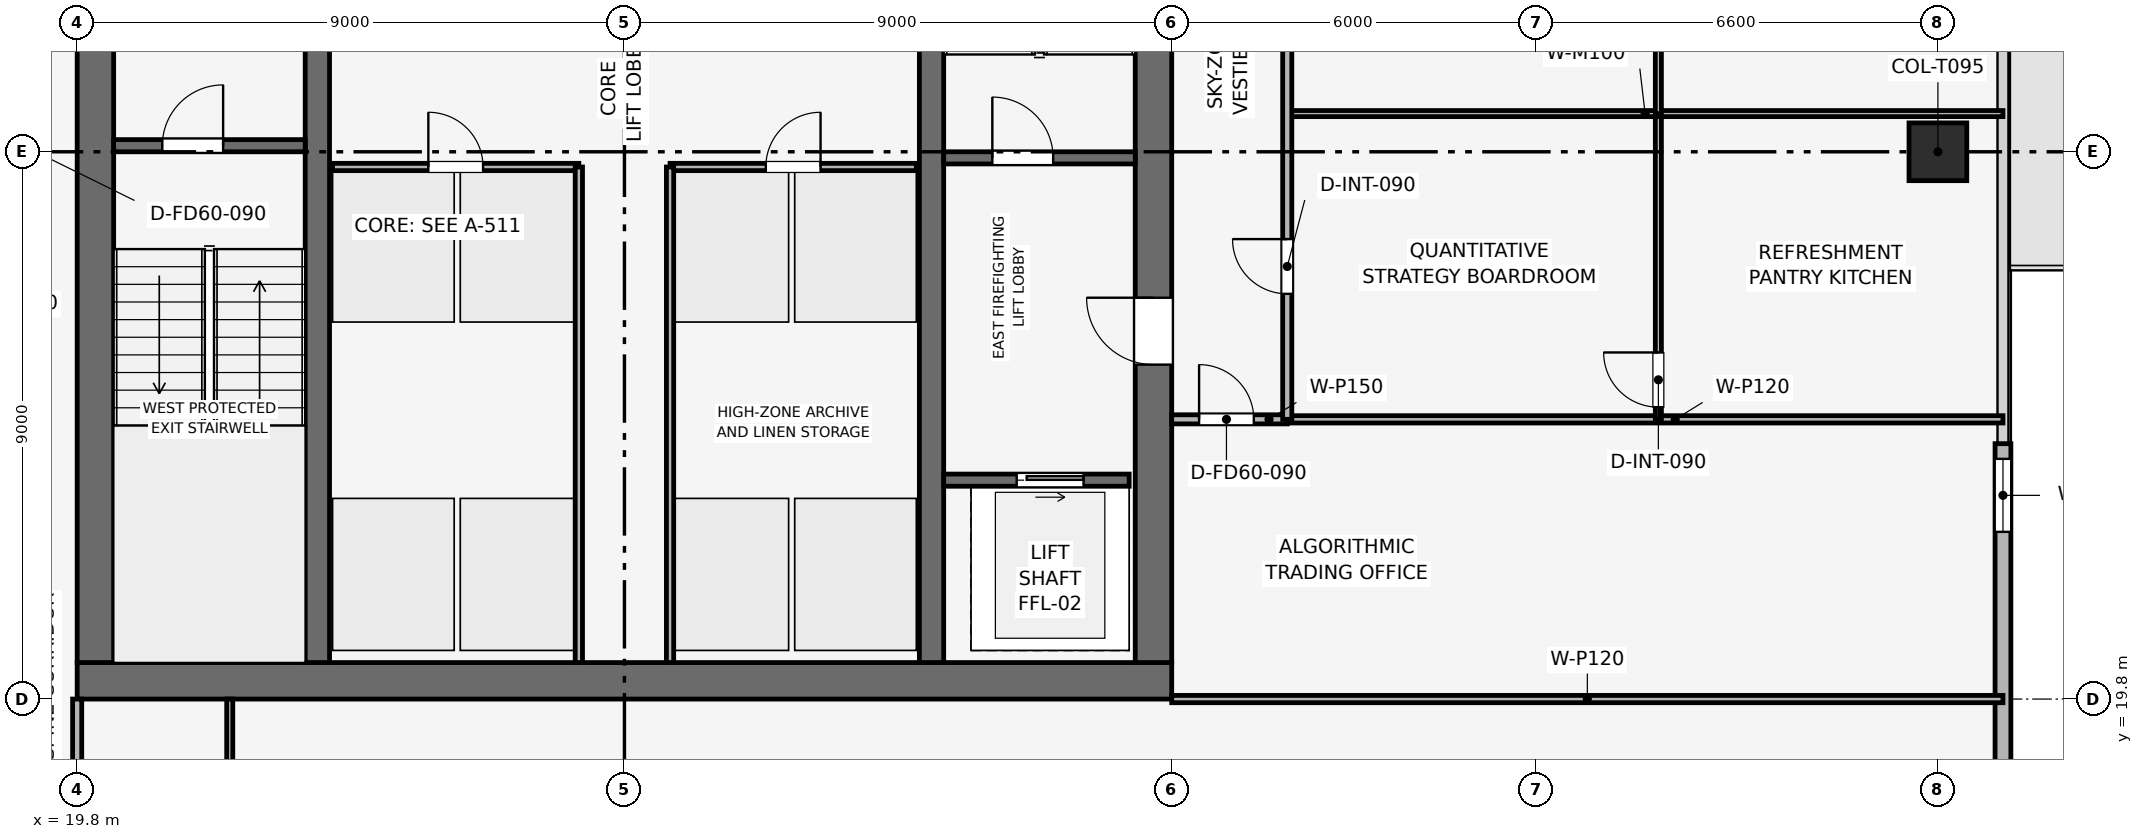
"""IFC4 building model, lengths in metres.
Left out: names, types, materials, properties, quantities, classifications, styles, units other than length and angle.
Written with IfcOpenShell. Run it as: python <this file> out.ifc"""

import sys

from ifc_helpers import new_model, si_unit, direction, frame, frame_2d, origin, origin_2d, place, context, subcontext, project, spatial, rectangle, extrude, element, fill, save


model = new_model("IFC4")
c1 = context("Model", 3, precision=1e-05, world=origin(), true_north=direction((0.0, 1.0)))
c2 = subcontext(c1, "Body", "Model", "MODEL_VIEW")
j1 = project(units=[si_unit("LENGTHUNIT", "METRE"), si_unit("PLANEANGLEUNIT", "RADIAN")], contexts=[c1])
p1 = place(None, origin())
s1 = spatial("IfcSite", under=j1, at=p1, CompositionType="ELEMENT")
p2 = place(p1, origin())
s2 = spatial("IfcBuilding", under=s1, at=p2, CompositionType="ELEMENT")
p3 = place(p2, frame((0.0, 0.0, 306.75)))
s3 = spatial("IfcBuildingStorey", under=s2, at=p3, CompositionType="ELEMENT", Elevation=306.75)
p4 = place(p3, frame((19.8, 20.1, 0.0), z_axis=(0.0, 0.0, 1.0), x_axis=(1.0, 0.0, 0.0)))
e1 = element("IfcWall", 1, at=p4, inside=s3, PredefinedType="SHEAR", context=c2, shape_type="SweptSolid", body=[
    extrude(rectangle(XDim=18.0, YDim=0.6, at=frame_2d((9.0, 0.0))), origin(), (0.0, 0.0, 1.0), 3.75),
])
p5 = place(p3, frame((20.1, 20.4, 0.0), z_axis=(0.0, 0.0, 1.0), x_axis=(0.0, 1.0, 0.0)))
e2 = element("IfcWall", 2, at=p5, inside=s3, PredefinedType="SHEAR", context=c2, shape_type="SweptSolid", body=[
    extrude(rectangle(XDim=16.8, YDim=0.6, at=frame_2d((8.4, 0.0))), origin(), (0.0, 0.0, 1.0), 3.75),
])
p6 = place(p5, frame((10.4, 0.0, 0.0)))
e3 = element("IfcOpeningElement", 3, at=p6, cuts=e2, PredefinedType="OPENING", context=c2, shape_type="SweptSolid", body=[
    extrude(rectangle(XDim=1.1, YDim=2.15, at=frame_2d((0.55, 1.075))), frame((0.0, 0.31, 0.0), z_axis=(0.0, -1.0, 0.0), x_axis=(1.0, 0.0, 0.0)), (0.0, 0.0, 1.0), 0.62),
])
p7 = place(p3, frame((37.5, 20.4, 0.0), z_axis=(0.0, 0.0, 1.0), x_axis=(0.0, 1.0, 0.0)))
e4 = element("IfcWall", 4, at=p7, inside=s3, PredefinedType="SHEAR", context=c2, shape_type="SweptSolid", body=[
    extrude(rectangle(XDim=16.8, YDim=0.6, at=frame_2d((8.4, 0.0))), origin(), (0.0, 0.0, 1.0), 3.75),
])
p8 = place(p7, frame((4.9, 0.0, 0.0)))
e5 = element("IfcOpeningElement", 5, at=p8, cuts=e4, PredefinedType="OPENING", context=c2, shape_type="SweptSolid", body=[
    extrude(rectangle(XDim=1.1, YDim=2.15, at=frame_2d((0.55, 1.075))), frame((0.0, 0.31, 0.0), z_axis=(0.0, -1.0, 0.0), x_axis=(1.0, 0.0, 0.0)), (0.0, 0.0, 1.0), 0.62),
])
for number, where, z_axis, x_axis in (
    (6, (23.75, 20.4, 0.0), (0.0, 0.0, 1.0), (0.0, 1.0, 0.0)),
    (7, (33.85, 20.4, 0.0), (0.0, 0.0, 1.0), (0.0, 1.0, 0.0)),
):
    element("IfcWall", number, at=place(p3, frame(where, z_axis=z_axis, x_axis=x_axis)), inside=s3, PredefinedType="SHEAR", context=c2, shape_type="SweptSolid", body=[
        extrude(rectangle(XDim=16.8, YDim=0.4, at=frame_2d((8.4, 0.0))), origin(), (0.0, 0.0, 1.0), 3.75),
    ])
p9 = place(p3, frame((50.4, 28.8, 0.003), z_axis=(0.0, 0.0, 1.0), x_axis=(1.0, 0.0, 0.0)))
e8 = element("IfcColumn", 8, at=p9, inside=s3, PredefinedType="COLUMN", context=c2, shape_type="SweptSolid", body=[
    extrude(rectangle(XDim=0.95, YDim=0.95, at=origin_2d()), origin(), (0.0, 0.0, 1.0), 3.504),
])
p10 = place(p3, frame((51.47, 24.0, 0.0), z_axis=(0.0, 0.0, 1.0), x_axis=(0.0, -1.0, 0.0)))
e9 = element("IfcWall", 9, at=p10, inside=s3, PredefinedType="SOLIDWALL", context=c2, shape_type="SweptSolid", body=[
    extrude(rectangle(XDim=11.7, YDim=0.26, at=frame_2d((5.85, 0.0))), origin(), (0.0, 0.0, 1.0), 3.51),
])
p11 = place(p10, frame((0.25, 0.0, 0.9)))
e10 = element("IfcOpeningElement", 10, at=p11, cuts=e9, PredefinedType="OPENING", context=c2, shape_type="SweptSolid", body=[
    extrude(rectangle(XDim=1.2, YDim=2.1, at=frame_2d((0.6, 1.05))), frame((0.0, 0.14, 0.0), z_axis=(0.0, -1.0, 0.0), x_axis=(1.0, 0.0, 0.0)), (0.0, 0.0, 1.0), 0.28),
])
p12 = place(p3, frame((20.4, 28.9, 0.0), z_axis=(0.0, 0.0, 1.0), x_axis=(1.0, 0.0, 0.0)))
e11 = element("IfcWall", 11, at=p12, inside=s3, PredefinedType="SHEAR", context=c2, shape_type="SweptSolid", body=[
    extrude(rectangle(XDim=3.15, YDim=0.2, at=frame_2d((1.575, 0.0))), origin(), (0.0, 0.0, 1.0), 3.51),
])
p13 = place(p12, frame((0.8, 0.0, 0.0)))
e12 = element("IfcOpeningElement", 12, at=p13, cuts=e11, PredefinedType="OPENING", context=c2, shape_type="SweptSolid", body=[
    extrude(rectangle(XDim=1.0, YDim=2.1, at=frame_2d((0.5, 1.05))), frame((0.0, 0.11, 0.0), z_axis=(0.0, -1.0, 0.0), x_axis=(1.0, 0.0, 0.0)), (0.0, 0.0, 1.0), 0.22),
])
p14 = place(p3, frame((34.05, 28.7, 0.0), z_axis=(0.0, 0.0, 1.0), x_axis=(1.0, 0.0, 0.0)))
e13 = element("IfcWall", 13, at=p14, inside=s3, PredefinedType="SHEAR", context=c2, shape_type="SweptSolid", body=[
    extrude(rectangle(XDim=3.15, YDim=0.2, at=frame_2d((1.575, 0.0))), origin(), (0.0, 0.0, 1.0), 3.51),
])
p15 = place(p14, frame((0.8, 0.0, 0.0)))
e14 = element("IfcOpeningElement", 14, at=p15, cuts=e13, PredefinedType="OPENING", context=c2, shape_type="SweptSolid", body=[
    extrude(rectangle(XDim=1.0, YDim=2.1, at=frame_2d((0.5, 1.05))), frame((0.0, 0.11, 0.0), z_axis=(0.0, -1.0, 0.0), x_axis=(1.0, 0.0, 0.0)), (0.0, 0.0, 1.0), 0.22),
])
p16 = place(p3, frame((34.05, 23.4, 0.0), z_axis=(0.0, 0.0, 1.0), x_axis=(1.0, 0.0, 0.0)))
e15 = element("IfcWall", 15, at=p16, inside=s3, PredefinedType="SHEAR", context=c2, shape_type="SweptSolid", body=[
    extrude(rectangle(XDim=3.05, YDim=0.2, at=frame_2d((1.525, 0.0))), origin(), (0.0, 0.0, 1.0), 3.51),
])
p17 = place(p16, frame((1.2, 0.0, 0.0)))
e16 = element("IfcOpeningElement", 16, at=p17, cuts=e15, PredefinedType="OPENING", context=c2, shape_type="SweptSolid", body=[
    extrude(rectangle(XDim=1.1, YDim=2.15, at=frame_2d((0.55, 1.075))), frame((0.0, 0.11, 0.0), z_axis=(0.0, -1.0, 0.0), x_axis=(1.0, 0.0, 0.0)), (0.0, 0.0, 1.0), 0.22),
])
p18 = place(p3, frame((24.0, 28.55, 0.0), z_axis=(0.0, 0.0, 1.0), x_axis=(1.0, 0.0, 0.0)))
e17 = element("IfcWall", 17, at=p18, inside=s3, PredefinedType="PARTITIONING", context=c2, shape_type="SweptSolid", body=[
    extrude(rectangle(XDim=4.05, YDim=0.12, at=frame_2d((2.025, 0.0))), origin(), (0.0, 0.0, 1.0), 3.51),
])
p19 = place(p18, frame((1.575, 0.0, 0.0)))
e18 = element("IfcOpeningElement", 18, at=p19, cuts=e17, PredefinedType="OPENING", context=c2, shape_type="SweptSolid", body=[
    extrude(rectangle(XDim=0.9, YDim=2.1, at=frame_2d((0.45, 1.05))), frame((0.0, 0.07, 0.0), z_axis=(0.0, -1.0, 0.0), x_axis=(1.0, 0.0, 0.0)), (0.0, 0.0, 1.0), 0.14),
])
p20 = place(p3, frame((28.05, 20.4, 0.0), z_axis=(0.0, 0.0, 1.0), x_axis=(0.0, 1.0, 0.0)))
e19 = element("IfcWall", 19, at=p20, inside=s3, PredefinedType="PARTITIONING", context=c2, shape_type="SweptSolid", body=[
    extrude(rectangle(XDim=8.15, YDim=0.12, at=frame_2d((4.075, 0.0))), origin(), (0.0, 0.0, 1.0), 3.51),
])
p21 = place(p3, frame((29.55, 28.55, 0.0), z_axis=(0.0, 0.0, 1.0), x_axis=(1.0, 0.0, 0.0)))
e20 = element("IfcWall", 20, at=p21, inside=s3, PredefinedType="PARTITIONING", context=c2, shape_type="SweptSolid", body=[
    extrude(rectangle(XDim=4.05, YDim=0.12, at=frame_2d((2.025, 0.0))), origin(), (0.0, 0.0, 1.0), 3.51),
])
p22 = place(p21, frame((1.575, 0.0, 0.0)))
e21 = element("IfcOpeningElement", 21, at=p22, cuts=e20, PredefinedType="OPENING", context=c2, shape_type="SweptSolid", body=[
    extrude(rectangle(XDim=0.9, YDim=2.1, at=frame_2d((0.45, 1.05))), frame((0.0, 0.07, 0.0), z_axis=(0.0, -1.0, 0.0), x_axis=(1.0, 0.0, 0.0)), (0.0, 0.0, 1.0), 0.14),
])
p23 = place(p3, frame((29.55, 20.4, 0.0), z_axis=(0.0, 0.0, 1.0), x_axis=(0.0, 1.0, 0.0)))
e22 = element("IfcWall", 22, at=p23, inside=s3, PredefinedType="PARTITIONING", context=c2, shape_type="SweptSolid", body=[
    extrude(rectangle(XDim=8.15, YDim=0.12, at=frame_2d((4.075, 0.0))), origin(), (0.0, 0.0, 1.0), 3.51),
])
p24 = place(p3, frame((19.8, 6.13, 0.0), z_axis=(0.0, 0.0, 1.0), x_axis=(0.0, 1.0, 0.0)))
e23 = element("IfcWall", 23, at=p24, inside=s3, PredefinedType="PARTITIONING", context=c2, shape_type="SweptSolid", body=[
    extrude(rectangle(XDim=13.67, YDim=0.15, at=frame_2d((6.835, 0.0))), origin(), (0.0, 0.0, 1.0), 3.095),
])
p25 = place(p24, frame((9.47, 0.0, 0.0)))
e24 = element("IfcOpeningElement", 24, at=p25, cuts=e23, PredefinedType="OPENING", context=c2, shape_type="SweptSolid", body=[
    extrude(rectangle(XDim=0.9, YDim=2.1, at=frame_2d((0.45, 1.05))), frame((0.0, 0.085, 0.0), z_axis=(0.0, -1.0, 0.0), x_axis=(1.0, 0.0, 0.0)), (0.0, 0.0, 1.0), 0.17),
])
p26 = place(p3, frame((22.309, 6.13, 0.0), z_axis=(0.0, 0.0, 1.0), x_axis=(0.0, 1.0, 0.0)))
e25 = element("IfcWall", 25, at=p26, inside=s3, PredefinedType="MOVABLE", context=c2, shape_type="SweptSolid", body=[
    extrude(rectangle(XDim=13.67, YDim=0.1, at=frame_2d((6.835, 0.0))), origin(), (0.0, 0.0, 1.0), 3.135),
])
p27 = place(p26, frame((11.27, 0.0, 0.0)))
e26 = element("IfcOpeningElement", 26, at=p27, cuts=e25, PredefinedType="OPENING", context=c2, shape_type="SweptSolid", body=[
    extrude(rectangle(XDim=0.9, YDim=2.1, at=frame_2d((0.45, 1.05))), frame((0.0, 0.06, 0.0), z_axis=(0.0, -1.0, 0.0), x_axis=(1.0, 0.0, 0.0)), (0.0, 0.0, 1.0), 0.12),
])
p28 = place(p3, frame((37.8, 19.8, 0.0), z_axis=(0.0, 0.0, 1.0), x_axis=(1.0, 0.0, 0.0)))
e27 = element("IfcWall", 27, at=p28, inside=s3, PredefinedType="PARTITIONING", context=c2, shape_type="SweptSolid", body=[
    extrude(rectangle(XDim=13.67, YDim=0.12, at=frame_2d((6.835, 0.0))), origin(), (0.0, 0.0, 1.0), 3.095),
])
p29 = place(p3, frame((37.8, 24.4, 0.0), z_axis=(0.0, 0.0, 1.0), x_axis=(1.0, 0.0, 0.0)))
e28 = element("IfcWall", 28, at=p29, inside=s3, PredefinedType="PARTITIONING", context=c2, shape_type="SweptSolid", body=[
    extrude(rectangle(XDim=1.9, YDim=0.15, at=frame_2d((0.95, 0.0))), origin(), (0.0, 0.0, 1.0), 3.51),
])
p30 = place(p29, frame((0.45, 0.0, 0.0)))
e29 = element("IfcOpeningElement", 29, at=p30, cuts=e28, PredefinedType="OPENING", context=c2, shape_type="SweptSolid", body=[
    extrude(rectangle(XDim=0.9, YDim=2.1, at=frame_2d((0.45, 1.05))), frame((0.0, 0.085, 0.0), z_axis=(0.0, -1.0, 0.0), x_axis=(1.0, 0.0, 0.0)), (0.0, 0.0, 1.0), 0.17),
])
p31 = place(p3, frame((39.7, 24.4, 0.0), z_axis=(0.0, 0.0, 1.0), x_axis=(1.0, 0.0, 0.0)))
e30 = element("IfcWall", 30, at=p31, inside=s3, PredefinedType="PARTITIONING", context=c2, shape_type="SweptSolid", body=[
    extrude(rectangle(XDim=11.77, YDim=0.12, at=frame_2d((5.885, 0.0))), origin(), (0.0, 0.0, 1.0), 3.135),
])
p32 = place(p3, frame((45.803, 24.4, 0.0), z_axis=(0.0, 0.0, 1.0), x_axis=(0.0, 1.0, 0.0)))
e31 = element("IfcWall", 31, at=p32, inside=s3, PredefinedType="MOVABLE", context=c2, shape_type="SweptSolid", body=[
    extrude(rectangle(XDim=5.028, YDim=0.1, at=frame_2d((2.514, 0.0))), origin(), (0.0, 0.0, 1.0), 3.095),
])
p33 = place(p32, frame((0.2, 0.0, 0.0)))
e32 = element("IfcOpeningElement", 32, at=p33, cuts=e31, PredefinedType="OPENING", context=c2, shape_type="SweptSolid", body=[
    extrude(rectangle(XDim=0.9, YDim=2.1, at=frame_2d((0.45, 1.05))), frame((0.0, 0.06, 0.0), z_axis=(0.0, -1.0, 0.0), x_axis=(1.0, 0.0, 0.0)), (0.0, 0.0, 1.0), 0.12),
])
p34 = place(p3, frame((39.7, 29.428, 0.0), z_axis=(0.0, 0.0, 1.0), x_axis=(1.0, 0.0, 0.0)))
e33 = element("IfcWall", 33, at=p34, inside=s3, PredefinedType="MOVABLE", context=c2, shape_type="SweptSolid", body=[
    extrude(rectangle(XDim=11.77, YDim=0.1, at=frame_2d((5.885, 0.0))), origin(), (0.0, 0.0, 1.0), 3.135),
])
p35 = place(p3, frame((45.803, 29.428, 0.0), z_axis=(0.0, 0.0, 1.0), x_axis=(0.0, 1.0, 0.0)))
e34 = element("IfcWall", 34, at=p35, inside=s3, PredefinedType="MOVABLE", context=c2, shape_type="SweptSolid", body=[
    extrude(rectangle(XDim=10.272, YDim=0.1, at=frame_2d((5.136, 0.0))), origin(), (0.0, 0.0, 1.0), 3.095),
])
p36 = place(p35, frame((5.808, 0.0, 0.0)))
e35 = element("IfcOpeningElement", 35, at=p36, cuts=e34, PredefinedType="OPENING", context=c2, shape_type="SweptSolid", body=[
    extrude(rectangle(XDim=0.9, YDim=2.1, at=frame_2d((0.45, 1.05))), frame((0.0, 0.06, 0.0), z_axis=(0.0, -1.0, 0.0), x_axis=(1.0, 0.0, 0.0)), (0.0, 0.0, 1.0), 0.12),
])
p37 = place(p3, frame((39.7, 24.4, 0.0), z_axis=(0.0, 0.0, 1.0), x_axis=(0.0, 1.0, 0.0)))
e36 = element("IfcWall", 36, at=p37, inside=s3, PredefinedType="PARTITIONING", context=c2, shape_type="SweptSolid", body=[
    extrude(rectangle(XDim=15.3, YDim=0.15, at=frame_2d((7.65, 0.0))), origin(), (0.0, 0.0, 1.0), 3.095),
])
p38 = place(p37, frame((2.064, 0.0, 0.0)))
e37 = element("IfcOpeningElement", 37, at=p38, cuts=e36, PredefinedType="OPENING", context=c2, shape_type="SweptSolid", body=[
    extrude(rectangle(XDim=0.9, YDim=2.1, at=frame_2d((0.45, 1.05))), frame((0.0, 0.085, 0.0), z_axis=(0.0, -1.0, 0.0), x_axis=(1.0, 0.0, 0.0)), (0.0, 0.0, 1.0), 0.17),
])
p39 = place(p37, frame((9.714, 0.0, 0.0)))
e38 = element("IfcOpeningElement", 38, at=p39, cuts=e36, PredefinedType="OPENING", context=c2, shape_type="SweptSolid", body=[
    extrude(rectangle(XDim=0.9, YDim=2.1, at=frame_2d((0.45, 1.05))), frame((0.0, 0.085, 0.0), z_axis=(0.0, -1.0, 0.0), x_axis=(1.0, 0.0, 0.0)), (0.0, 0.0, 1.0), 0.17),
])
p40 = place(p11, origin())
e39 = element("IfcWindow", 39, at=p40, inside=s3, PartitioningType="SINGLE_PANEL", PredefinedType="WINDOW", context=c2, shape_type="SweptSolid", body=[
    extrude(rectangle(XDim=1.2, YDim=2.1, at=frame_2d((0.6, 1.05))), frame((0.0, 0.03, 0.0), z_axis=(0.0, -1.0, 0.0), x_axis=(1.0, 0.0, 0.0)), (0.0, 0.0, 1.0), 0.06),
])
fill(e10, e39)
p41 = place(p13, origin())
e40 = element("IfcDoor", 40, at=p41, inside=s3, OperationType="SINGLE_SWING_RIGHT", PredefinedType="DOOR", context=c2, shape_type="SweptSolid", body=[
    extrude(rectangle(XDim=1.0, YDim=2.1, at=frame_2d((0.5, 1.05))), frame((0.0, 0.025, 0.0), z_axis=(0.0, -1.0, 0.0), x_axis=(1.0, 0.0, 0.0)), (0.0, 0.0, 1.0), 0.05),
])
fill(e12, e40)
p42 = place(p15, origin())
e41 = element("IfcDoor", 41, at=p42, inside=s3, OperationType="SINGLE_SWING_LEFT", PredefinedType="DOOR", context=c2, shape_type="SweptSolid", body=[
    extrude(rectangle(XDim=1.0, YDim=2.1, at=frame_2d((0.5, 1.05))), frame((0.0, 0.025, 0.0), z_axis=(0.0, -1.0, 0.0), x_axis=(1.0, 0.0, 0.0)), (0.0, 0.0, 1.0), 0.05),
])
fill(e14, e41)
p43 = place(p17, origin())
e42 = element("IfcDoor", 42, at=p43, inside=s3, OperationType="SLIDING_TO_RIGHT", PredefinedType="DOOR", context=c2, shape_type="SweptSolid", body=[
    extrude(rectangle(XDim=1.1, YDim=2.15, at=frame_2d((0.55, 1.075))), frame((0.0, 0.025, 0.0), z_axis=(0.0, -1.0, 0.0), x_axis=(1.0, 0.0, 0.0)), (0.0, 0.0, 1.0), 0.05),
])
fill(e16, e42)
p44 = place(p19, origin())
e43 = element("IfcDoor", 43, at=p44, inside=s3, OperationType="SINGLE_SWING_LEFT", PredefinedType="DOOR", context=c2, shape_type="SweptSolid", body=[
    extrude(rectangle(XDim=0.9, YDim=2.1, at=frame_2d((0.45, 1.05))), frame((0.0, 0.025, 0.0), z_axis=(0.0, -1.0, 0.0), x_axis=(1.0, 0.0, 0.0)), (0.0, 0.0, 1.0), 0.05),
])
fill(e18, e43)
p45 = place(p22, origin())
e44 = element("IfcDoor", 44, at=p45, inside=s3, OperationType="SINGLE_SWING_RIGHT", PredefinedType="DOOR", context=c2, shape_type="SweptSolid", body=[
    extrude(rectangle(XDim=0.9, YDim=2.1, at=frame_2d((0.45, 1.05))), frame((0.0, 0.025, 0.0), z_axis=(0.0, -1.0, 0.0), x_axis=(1.0, 0.0, 0.0)), (0.0, 0.0, 1.0), 0.05),
])
fill(e21, e44)
p46 = place(p30, origin())
e45 = element("IfcDoor", 45, at=p46, inside=s3, OperationType="SINGLE_SWING_LEFT", PredefinedType="DOOR", context=c2, shape_type="SweptSolid", body=[
    extrude(rectangle(XDim=0.9, YDim=2.1, at=frame_2d((0.45, 1.05))), frame((0.0, 0.025, 0.0), z_axis=(0.0, -1.0, 0.0), x_axis=(1.0, 0.0, 0.0)), (0.0, 0.0, 1.0), 0.05),
])
fill(e29, e45)
p47 = place(p33, origin())
e46 = element("IfcDoor", 46, at=p47, inside=s3, OperationType="SINGLE_SWING_RIGHT", PredefinedType="DOOR", context=c2, shape_type="SweptSolid", body=[
    extrude(rectangle(XDim=0.9, YDim=2.1, at=frame_2d((0.45, 1.05))), frame((0.0, 0.025, 0.0), z_axis=(0.0, -1.0, 0.0), x_axis=(1.0, 0.0, 0.0)), (0.0, 0.0, 1.0), 0.05),
])
fill(e32, e46)
p48 = place(p38, origin())
e47 = element("IfcDoor", 47, at=p48, inside=s3, OperationType="SINGLE_SWING_RIGHT", PredefinedType="DOOR", context=c2, shape_type="SweptSolid", body=[
    extrude(rectangle(XDim=0.9, YDim=2.1, at=frame_2d((0.45, 1.05))), frame((0.0, 0.025, 0.0), z_axis=(0.0, -1.0, 0.0), x_axis=(1.0, 0.0, 0.0)), (0.0, 0.0, 1.0), 0.05),
])
fill(e37, e47)
p49 = place(p8, origin())
e48 = element("IfcDoor", 48, at=p49, inside=s3, OperationType="SINGLE_SWING_RIGHT", PredefinedType="DOOR", context=c2, shape_type="SweptSolid", body=[
    extrude(rectangle(XDim=1.1, YDim=2.15, at=frame_2d((0.55, 1.075))), frame((0.0, 0.025, 0.0), z_axis=(0.0, -1.0, 0.0), x_axis=(1.0, 0.0, 0.0)), (0.0, 0.0, 1.0), 0.05),
])
fill(e5, e48)
save(model, sys.argv[1])
